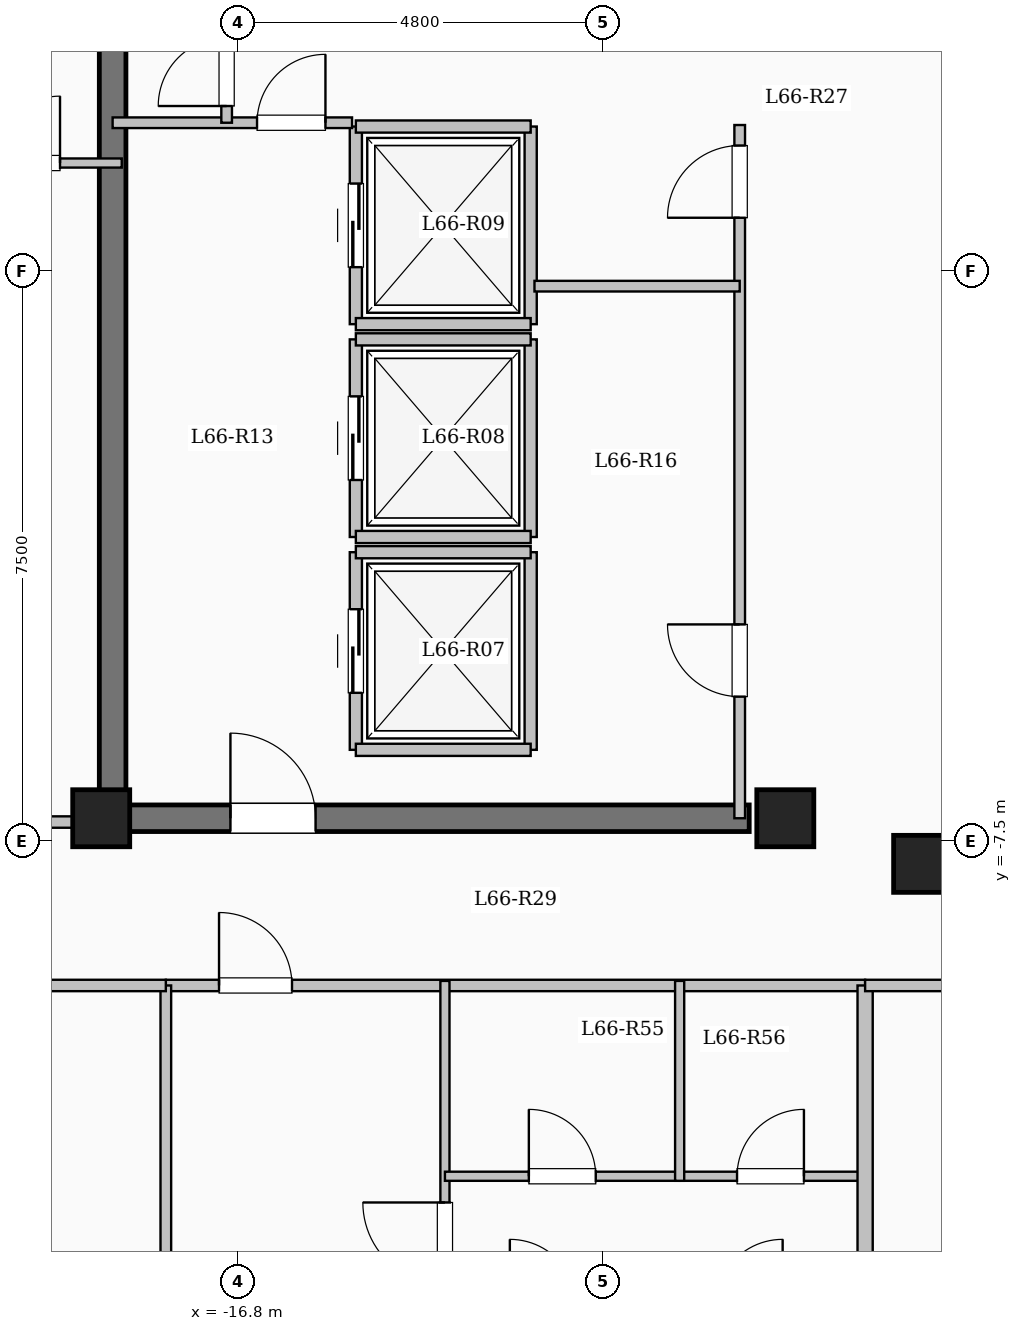
"""IFC4 building model, lengths in metres.
Left out: names, types, materials, properties, quantities, classifications, styles, units other than length and angle.
Written with IfcOpenShell. Run it as: python <this file> out.ifc"""

import sys

from ifc_helpers import new_model, si_unit, direction, frame, frame_2d, origin, origin_2d, place, context, subcontext, project, spatial, rectangle, extrude, element, fill, save


model = new_model("IFC4")
c1 = context("Model", 3, precision=1e-05, world=origin(), true_north=direction((0.0, 1.0)))
c2 = subcontext(c1, "Body", "Model", "MODEL_VIEW")
j1 = project(units=[si_unit("LENGTHUNIT", "METRE"), si_unit("PLANEANGLEUNIT", "RADIAN")], contexts=[c1])
p1 = place(None, origin())
s1 = spatial("IfcSite", under=j1, at=p1, CompositionType="ELEMENT")
p2 = place(p1, origin())
s2 = spatial("IfcBuilding", under=s1, at=p2, CompositionType="ELEMENT")
p3 = place(p2, frame((0.0, 0.0, 244.85)))
s3 = spatial("IfcBuildingStorey", under=s2, at=p3, CompositionType="ELEMENT", Elevation=244.85)
for number, where, z_axis, x_axis in (
    (1, (-7.8, -7.8, 0.0), (0.0, 0.0, 1.0), (1.0, 0.0, 0.0)),
    (2, (-9.6, -7.2, 0.0), (0.0, 0.0, 1.0), (1.0, 0.0, 0.0)),
    (3, (-18.6, -7.2, 0.0), (0.0, 0.0, 1.0), (1.0, 0.0, 0.0)),
):
    element("IfcColumn", number, at=place(p3, frame(where, z_axis=z_axis, x_axis=x_axis)), inside=s3, PredefinedType="COLUMN", context=c2, shape_type="SweptSolid", body=[
        extrude(rectangle(XDim=0.75, YDim=0.75, at=origin_2d()), origin(), (0.0, 0.0, 1.0), 3.35),
    ])
p4 = place(p3, frame((-15.25, -6.3, 0.0), z_axis=(0.0, 0.0, 1.0), x_axis=(0.0, 1.0, 0.0)))
e4 = element("IfcWall", 4, at=p4, inside=s3, PredefinedType="SOLIDWALL", context=c2, shape_type="SweptSolid", body=[
    extrude(rectangle(XDim=2.6, YDim=0.16, at=frame_2d((1.3, 0.0))), origin(), (0.0, 0.0, 1.0), 3.1),
])
p5 = place(p4, frame((0.75, 0.0, 0.0)))
e5 = element("IfcOpeningElement", 5, at=p5, cuts=e4, PredefinedType="OPENING", context=c2, shape_type="SweptSolid", body=[
    extrude(rectangle(XDim=1.1, YDim=2.15, at=frame_2d((0.55, 1.075))), frame((0.0, 0.09, 0.0), z_axis=(0.0, -1.0, 0.0), x_axis=(1.0, 0.0, 0.0)), (0.0, 0.0, 1.0), 0.18),
])
p6 = place(p3, frame((-12.95, -6.3, 0.0), z_axis=(0.0, 0.0, 1.0), x_axis=(0.0, 1.0, 0.0)))
e6 = element("IfcWall", 6, at=p6, inside=s3, PredefinedType="SOLIDWALL", context=c2, shape_type="SweptSolid", body=[
    extrude(rectangle(XDim=2.6, YDim=0.16, at=frame_2d((1.3, 0.0))), origin(), (0.0, 0.0, 1.0), 3.1),
])
for number, where, z_axis, x_axis in (
    (7, (-15.25, -6.3, 0.0), (0.0, 0.0, 1.0), (1.0, 0.0, 0.0)),
    (8, (-15.25, -3.7, 0.0), (0.0, 0.0, 1.0), (1.0, 0.0, 0.0)),
):
    element("IfcWall", number, at=place(p3, frame(where, z_axis=z_axis, x_axis=x_axis)), inside=s3, PredefinedType="SOLIDWALL", context=c2, shape_type="SweptSolid", body=[
        extrude(rectangle(XDim=2.3, YDim=0.16, at=frame_2d((1.15, 0.0))), origin(), (0.0, 0.0, 1.0), 3.1),
    ])
p7 = place(p3, frame((-15.25, -3.5, 0.0), z_axis=(0.0, 0.0, 1.0), x_axis=(0.0, 1.0, 0.0)))
e9 = element("IfcWall", 9, at=p7, inside=s3, PredefinedType="SOLIDWALL", context=c2, shape_type="SweptSolid", body=[
    extrude(rectangle(XDim=2.6, YDim=0.16, at=frame_2d((1.3, 0.0))), origin(), (0.0, 0.0, 1.0), 3.1),
])
p8 = place(p7, frame((0.75, 0.0, 0.0)))
e10 = element("IfcOpeningElement", 10, at=p8, cuts=e9, PredefinedType="OPENING", context=c2, shape_type="SweptSolid", body=[
    extrude(rectangle(XDim=1.1, YDim=2.15, at=frame_2d((0.55, 1.075))), frame((0.0, 0.09, 0.0), z_axis=(0.0, -1.0, 0.0), x_axis=(1.0, 0.0, 0.0)), (0.0, 0.0, 1.0), 0.18),
])
p9 = place(p3, frame((-12.95, -3.5, 0.0), z_axis=(0.0, 0.0, 1.0), x_axis=(0.0, 1.0, 0.0)))
e11 = element("IfcWall", 11, at=p9, inside=s3, PredefinedType="SOLIDWALL", context=c2, shape_type="SweptSolid", body=[
    extrude(rectangle(XDim=2.6, YDim=0.16, at=frame_2d((1.3, 0.0))), origin(), (0.0, 0.0, 1.0), 3.1),
])
for number, where, z_axis, x_axis in (
    (12, (-15.25, -3.5, 0.0), (0.0, 0.0, 1.0), (1.0, 0.0, 0.0)),
    (13, (-15.25, -0.9, 0.0), (0.0, 0.0, 1.0), (1.0, 0.0, 0.0)),
):
    element("IfcWall", number, at=place(p3, frame(where, z_axis=z_axis, x_axis=x_axis)), inside=s3, PredefinedType="SOLIDWALL", context=c2, shape_type="SweptSolid", body=[
        extrude(rectangle(XDim=2.3, YDim=0.16, at=frame_2d((1.15, 0.0))), origin(), (0.0, 0.0, 1.0), 3.1),
    ])
p10 = place(p3, frame((-15.25, -0.7, 0.0), z_axis=(0.0, 0.0, 1.0), x_axis=(0.0, 1.0, 0.0)))
e14 = element("IfcWall", 14, at=p10, inside=s3, PredefinedType="SOLIDWALL", context=c2, shape_type="SweptSolid", body=[
    extrude(rectangle(XDim=2.6, YDim=0.16, at=frame_2d((1.3, 0.0))), origin(), (0.0, 0.0, 1.0), 3.1),
])
p11 = place(p10, frame((0.75, 0.0, 0.0)))
e15 = element("IfcOpeningElement", 15, at=p11, cuts=e14, PredefinedType="OPENING", context=c2, shape_type="SweptSolid", body=[
    extrude(rectangle(XDim=1.1, YDim=2.15, at=frame_2d((0.55, 1.075))), frame((0.0, 0.09, 0.0), z_axis=(0.0, -1.0, 0.0), x_axis=(1.0, 0.0, 0.0)), (0.0, 0.0, 1.0), 0.18),
])
p12 = place(p3, frame((-12.95, -0.7, 0.0), z_axis=(0.0, 0.0, 1.0), x_axis=(0.0, 1.0, 0.0)))
e16 = element("IfcWall", 16, at=p12, inside=s3, PredefinedType="SOLIDWALL", context=c2, shape_type="SweptSolid", body=[
    extrude(rectangle(XDim=2.6, YDim=0.16, at=frame_2d((1.3, 0.0))), origin(), (0.0, 0.0, 1.0), 3.1),
])
for number, where, z_axis, x_axis in (
    (17, (-15.25, -0.7, 0.0), (0.0, 0.0, 1.0), (1.0, 0.0, 0.0)),
    (18, (-15.25, 1.9, 0.0), (0.0, 0.0, 1.0), (1.0, 0.0, 0.0)),
):
    element("IfcWall", number, at=place(p3, frame(where, z_axis=z_axis, x_axis=x_axis)), inside=s3, PredefinedType="SOLIDWALL", context=c2, shape_type="SweptSolid", body=[
        extrude(rectangle(XDim=2.3, YDim=0.16, at=frame_2d((1.15, 0.0))), origin(), (0.0, 0.0, 1.0), 3.1),
    ])
p13 = place(p3, frame((-18.45, -7.375, 0.0), z_axis=(0.0, 0.0, 1.0), x_axis=(0.0, 1.0, 0.0)))
e19 = element("IfcWall", 19, at=p13, inside=s3, PredefinedType="SHEAR", context=c2, shape_type="SweptSolid", body=[
    extrude(rectangle(XDim=14.05, YDim=0.35, at=frame_2d((7.025, 0.0))), origin(), (0.0, 0.0, 1.0), 3.35),
])
p14 = place(p3, frame((-18.625, -7.2, 0.0), z_axis=(0.0, 0.0, 1.0), x_axis=(1.0, 0.0, 0.0)))
e20 = element("IfcWall", 20, at=p14, inside=s3, PredefinedType="SHEAR", context=c2, shape_type="SweptSolid", body=[
    extrude(rectangle(XDim=8.55, YDim=0.35, at=frame_2d((4.275, 0.0))), origin(), (0.0, 0.0, 1.0), 3.35),
])
p15 = place(p14, frame((1.725, 0.0, 0.0)))
e21 = element("IfcOpeningElement", 21, at=p15, cuts=e20, PredefinedType="OPENING", context=c2, shape_type="SweptSolid", body=[
    extrude(rectangle(XDim=1.12, YDim=2.15, at=frame_2d((0.56, 1.075))), frame((0.0, 0.185, 0.0), z_axis=(0.0, -1.0, 0.0), x_axis=(1.0, 0.0, 0.0)), (0.0, 0.0, 1.0), 0.37),
])
p16 = place(p3, frame((-18.45, 1.95, 0.0), z_axis=(0.0, 0.0, 1.0), x_axis=(1.0, 0.0, 0.0)))
e22 = element("IfcWall", 22, at=p16, inside=s3, PredefinedType="PARTITIONING", context=c2, shape_type="SweptSolid", body=[
    extrude(rectangle(XDim=3.15, YDim=0.14, at=frame_2d((1.575, 0.0))), origin(), (0.0, 0.0, 1.0), 3.1),
])
p17 = place(p16, frame((1.9, 0.0, 0.0)))
e23 = element("IfcOpeningElement", 23, at=p17, cuts=e22, PredefinedType="OPENING", context=c2, shape_type="SweptSolid", body=[
    extrude(rectangle(XDim=0.9, YDim=2.08, at=frame_2d((0.45, 1.04))), frame((0.0, 0.08, 0.0), z_axis=(0.0, -1.0, 0.0), x_axis=(1.0, 0.0, 0.0)), (0.0, 0.0, 1.0), 0.16),
])
p18 = place(p3, frame((-16.95, 1.95, 0.0), z_axis=(0.0, 0.0, 1.0), x_axis=(0.0, 1.0, 0.0)))
e24 = element("IfcWall", 24, at=p18, inside=s3, PredefinedType="PARTITIONING", context=c2, shape_type="SweptSolid", body=[
    extrude(rectangle(XDim=1.3, YDim=0.14, at=frame_2d((0.65, 0.0))), origin(), (0.0, 0.0, 1.0), 3.1),
])
p19 = place(p18, frame((0.22, 0.0, 0.0)))
e25 = element("IfcOpeningElement", 25, at=p19, cuts=e24, PredefinedType="OPENING", context=c2, shape_type="SweptSolid", body=[
    extrude(rectangle(XDim=0.9, YDim=2.08, at=frame_2d((0.45, 1.04))), frame((0.0, 0.08, 0.0), z_axis=(0.0, -1.0, 0.0), x_axis=(1.0, 0.0, 0.0)), (0.0, 0.0, 1.0), 0.16),
])
p20 = place(p3, frame((-10.2, -7.2, 0.0), z_axis=(0.0, 0.0, 1.0), x_axis=(0.0, 1.0, 0.0)))
e26 = element("IfcWall", 26, at=p20, inside=s3, PredefinedType="PARTITIONING", context=c2, shape_type="SweptSolid", body=[
    extrude(rectangle(XDim=9.12, YDim=0.14, at=frame_2d((4.56, 0.0))), origin(), (0.0, 0.0, 1.0), 3.1),
])
p21 = place(p20, frame((1.6, 0.0, 0.0)))
e27 = element("IfcOpeningElement", 27, at=p21, cuts=e26, PredefinedType="OPENING", context=c2, shape_type="SweptSolid", body=[
    extrude(rectangle(XDim=0.95, YDim=2.12, at=frame_2d((0.475, 1.06))), frame((0.0, 0.08, 0.0), z_axis=(0.0, -1.0, 0.0), x_axis=(1.0, 0.0, 0.0)), (0.0, 0.0, 1.0), 0.16),
])
p22 = place(p20, frame((7.9, 0.0, 0.0)))
e28 = element("IfcOpeningElement", 28, at=p22, cuts=e26, PredefinedType="OPENING", context=c2, shape_type="SweptSolid", body=[
    extrude(rectangle(XDim=0.95, YDim=2.12, at=frame_2d((0.475, 1.06))), frame((0.0, 0.08, 0.0), z_axis=(0.0, -1.0, 0.0), x_axis=(1.0, 0.0, 0.0)), (0.0, 0.0, 1.0), 0.16),
])
p23 = place(p3, frame((-12.9, -0.2, 0.0), z_axis=(0.0, 0.0, 1.0), x_axis=(1.0, 0.0, 0.0)))
e29 = element("IfcWall", 29, at=p23, inside=s3, PredefinedType="PARTITIONING", context=c2, shape_type="SweptSolid", body=[
    extrude(rectangle(XDim=2.7, YDim=0.14, at=frame_2d((1.35, 0.0))), origin(), (0.0, 0.0, 1.0), 3.1),
])
p24 = place(p3, frame((-17.75, -9.4, 0.0), z_axis=(0.0, 0.0, 1.0), x_axis=(1.0, 0.0, 0.0)))
e30 = element("IfcWall", 30, at=p24, inside=s3, PredefinedType="PARTITIONING", context=c2, shape_type="SweptSolid", body=[
    extrude(rectangle(XDim=9.2, YDim=0.15, at=frame_2d((4.6, 0.0))), origin(), (0.0, 0.0, 1.0), 3.1),
])
p25 = place(p24, frame((0.7, 0.0, 0.0)))
e31 = element("IfcOpeningElement", 31, at=p25, cuts=e30, PredefinedType="OPENING", context=c2, shape_type="SweptSolid", body=[
    extrude(rectangle(XDim=0.96, YDim=2.15, at=frame_2d((0.48, 1.075))), frame((0.0, 0.085, 0.0), z_axis=(0.0, -1.0, 0.0), x_axis=(1.0, 0.0, 0.0)), (0.0, 0.0, 1.0), 0.17),
])
p26 = place(p3, frame((-14.078, -20.9, 0.0), z_axis=(0.0, 0.0, 1.0), x_axis=(0.0, 1.0, 0.0)))
e32 = element("IfcWall", 32, at=p26, inside=s3, PredefinedType="PARTITIONING", context=c2, shape_type="SweptSolid", body=[
    extrude(rectangle(XDim=11.56, YDim=0.12, at=frame_2d((5.78, 0.0))), origin(), (0.0, 0.0, 1.0), 3.1),
])
p27 = place(p26, frame((7.565, 0.0, 0.0)))
e33 = element("IfcOpeningElement", 33, at=p27, cuts=e32, PredefinedType="OPENING", context=c2, shape_type="SweptSolid", body=[
    extrude(rectangle(XDim=1.08, YDim=2.15, at=frame_2d((0.54, 1.075))), frame((0.0, 0.07, 0.0), z_axis=(0.0, -1.0, 0.0), x_axis=(1.0, 0.0, 0.0)), (0.0, 0.0, 1.0), 0.14),
])
p28 = place(p3, frame((-14.078, -11.91, 0.0), z_axis=(0.0, 0.0, 1.0), x_axis=(1.0, 0.0, 0.0)))
e34 = element("IfcWall", 34, at=p28, inside=s3, PredefinedType="PARTITIONING", context=c2, shape_type="SweptSolid", body=[
    extrude(rectangle(XDim=3.088, YDim=0.12, at=frame_2d((1.544, 0.0))), origin(), (0.0, 0.0, 1.0), 3.1),
])
p29 = place(p28, frame((1.104, 0.0, 0.0)))
e35 = element("IfcOpeningElement", 35, at=p29, cuts=e34, PredefinedType="OPENING", context=c2, shape_type="SweptSolid", body=[
    extrude(rectangle(XDim=0.88, YDim=2.1, at=frame_2d((0.44, 1.05))), frame((0.0, 0.07, 0.0), z_axis=(0.0, -1.0, 0.0), x_axis=(1.0, 0.0, 0.0)), (0.0, 0.0, 1.0), 0.14),
])
p30 = place(p3, frame((-10.99, -11.91, 0.0), z_axis=(0.0, 0.0, 1.0), x_axis=(1.0, 0.0, 0.0)))
e36 = element("IfcWall", 36, at=p30, inside=s3, PredefinedType="PARTITIONING", context=c2, shape_type="SweptSolid", body=[
    extrude(rectangle(XDim=2.39, YDim=0.12, at=frame_2d((1.195, 0.0))), origin(), (0.0, 0.0, 1.0), 3.1),
])
p31 = place(p30, frame((0.755, 0.0, 0.0)))
e37 = element("IfcOpeningElement", 37, at=p31, cuts=e36, PredefinedType="OPENING", context=c2, shape_type="SweptSolid", body=[
    extrude(rectangle(XDim=0.88, YDim=2.1, at=frame_2d((0.44, 1.05))), frame((0.0, 0.07, 0.0), z_axis=(0.0, -1.0, 0.0), x_axis=(1.0, 0.0, 0.0)), (0.0, 0.0, 1.0), 0.14),
])
p32 = place(p3, frame((-10.99, -11.97, 0.0), z_axis=(0.0, 0.0, 1.0), x_axis=(0.0, 1.0, 0.0)))
e38 = element("IfcWall", 38, at=p32, inside=s3, PredefinedType="PARTITIONING", context=c2, shape_type="SweptSolid", body=[
    extrude(rectangle(XDim=2.63, YDim=0.12, at=frame_2d((1.315, 0.0))), origin(), (0.0, 0.0, 1.0), 3.1),
])
p33 = place(p3, frame((-8.55, -21.504, 0.0), z_axis=(0.0, 0.0, 1.0), x_axis=(0.0, 1.0, 0.0)))
e39 = element("IfcWall", 39, at=p33, inside=s3, PredefinedType="SOLIDWALL", context=c2, shape_type="SweptSolid", body=[
    extrude(rectangle(XDim=12.104, YDim=0.2, at=frame_2d((6.052, 0.0))), origin(), (0.0, 0.0, 1.0), 3.1),
])
p34 = place(p3, frame((-8.55, -9.4, 0.0), z_axis=(0.0, 0.0, 1.0), x_axis=(1.0, 0.0, 0.0)))
e40 = element("IfcWall", 40, at=p34, inside=s3, PredefinedType="PARTITIONING", context=c2, shape_type="SweptSolid", body=[
    extrude(rectangle(XDim=17.1, YDim=0.15, at=frame_2d((8.55, 0.0))), origin(), (0.0, 0.0, 1.0), 3.1),
])
p35 = place(p34, frame((1.75, 0.0, 0.0)))
e41 = element("IfcOpeningElement", 41, at=p35, cuts=e40, PredefinedType="OPENING", context=c2, shape_type="SweptSolid", body=[
    extrude(rectangle(XDim=0.96, YDim=2.15, at=frame_2d((0.48, 1.075))), frame((0.0, 0.085, 0.0), z_axis=(0.0, -1.0, 0.0), x_axis=(1.0, 0.0, 0.0)), (0.0, 0.0, 1.0), 0.17),
])
p36 = place(p3, frame((-22.68, -7.25, 0.0), z_axis=(0.0, 0.0, 1.0), x_axis=(1.0, 0.0, 0.0)))
e42 = element("IfcWall", 42, at=p36, inside=s3, PredefinedType="PARTITIONING", context=c2, shape_type="SweptSolid", body=[
    extrude(rectangle(XDim=4.23, YDim=0.15, at=frame_2d((2.115, 0.0))), origin(), (0.0, 0.0, 1.0), 3.1),
])
p37 = place(p36, frame((1.73, 0.0, 0.0)))
e43 = element("IfcOpeningElement", 43, at=p37, cuts=e42, PredefinedType="OPENING", context=c2, shape_type="SweptSolid", body=[
    extrude(rectangle(XDim=0.96, YDim=2.15, at=frame_2d((0.48, 1.075))), frame((0.0, 0.085, 0.0), z_axis=(0.0, -1.0, 0.0), x_axis=(1.0, 0.0, 0.0)), (0.0, 0.0, 1.0), 0.17),
])
p38 = place(p3, frame((-17.75, -17.55, 0.0), z_axis=(0.0, 0.0, 1.0), x_axis=(0.0, 1.0, 0.0)))
e44 = element("IfcWall", 44, at=p38, inside=s3, PredefinedType="PARTITIONING", context=c2, shape_type="SweptSolid", body=[
    extrude(rectangle(XDim=8.15, YDim=0.14, at=frame_2d((4.075, 0.0))), origin(), (0.0, 0.0, 1.0), 3.1),
])
p39 = place(p3, frame((-22.68, -9.4, 0.0), z_axis=(0.0, 0.0, 1.0), x_axis=(1.0, 0.0, 0.0)))
e45 = element("IfcWall", 45, at=p39, inside=s3, PredefinedType="PARTITIONING", context=c2, shape_type="SweptSolid", body=[
    extrude(rectangle(XDim=4.93, YDim=0.15, at=frame_2d((2.465, 0.0))), origin(), (0.0, 0.0, 1.0), 3.1),
])
p40 = place(p39, frame((1.99, 0.0, 0.0)))
e46 = element("IfcOpeningElement", 46, at=p40, cuts=e45, PredefinedType="OPENING", context=c2, shape_type="SweptSolid", body=[
    extrude(rectangle(XDim=0.95, YDim=2.15, at=frame_2d((0.475, 1.075))), frame((0.0, 0.085, 0.0), z_axis=(0.0, -1.0, 0.0), x_axis=(1.0, 0.0, 0.0)), (0.0, 0.0, 1.0), 0.17),
])
p41 = place(p3, frame((-22.8, 1.42, 0.0), z_axis=(0.0, 0.0, 1.0), x_axis=(1.0, 0.0, 0.0)))
e47 = element("IfcWall", 47, at=p41, inside=s3, PredefinedType="PARTITIONING", context=c2, shape_type="SweptSolid", body=[
    extrude(rectangle(XDim=4.47, YDim=0.12, at=frame_2d((2.235, 0.0))), origin(), (0.0, 0.0, 1.0), 3.1),
])
p42 = place(p41, frame((0.713, 0.0, 0.0)))
e48 = element("IfcOpeningElement", 48, at=p42, cuts=e47, PredefinedType="OPENING", context=c2, shape_type="SweptSolid", body=[
    extrude(rectangle(XDim=0.88, YDim=2.1, at=frame_2d((0.44, 1.05))), frame((0.0, 0.07, 0.0), z_axis=(0.0, -1.0, 0.0), x_axis=(1.0, 0.0, 0.0)), (0.0, 0.0, 1.0), 0.14),
])
p43 = place(p41, frame((2.778, 0.0, 0.0)))
e49 = element("IfcOpeningElement", 49, at=p43, cuts=e47, PredefinedType="OPENING", context=c2, shape_type="SweptSolid", body=[
    extrude(rectangle(XDim=0.88, YDim=2.1, at=frame_2d((0.44, 1.05))), frame((0.0, 0.07, 0.0), z_axis=(0.0, -1.0, 0.0), x_axis=(1.0, 0.0, 0.0)), (0.0, 0.0, 1.0), 0.14),
])
p44 = place(p5, origin())
e50 = element("IfcDoor", 50, at=p44, inside=s3, OperationType="SLIDING_TO_LEFT", PredefinedType="DOOR", context=c2, shape_type="SweptSolid", body=[
    extrude(rectangle(XDim=1.1, YDim=2.15, at=frame_2d((0.55, 1.075))), frame((0.0, 0.025, 0.0), z_axis=(0.0, -1.0, 0.0), x_axis=(1.0, 0.0, 0.0)), (0.0, 0.0, 1.0), 0.05),
])
fill(e5, e50)
p45 = place(p8, origin())
e51 = element("IfcDoor", 51, at=p45, inside=s3, OperationType="SLIDING_TO_LEFT", PredefinedType="DOOR", context=c2, shape_type="SweptSolid", body=[
    extrude(rectangle(XDim=1.1, YDim=2.15, at=frame_2d((0.55, 1.075))), frame((0.0, 0.025, 0.0), z_axis=(0.0, -1.0, 0.0), x_axis=(1.0, 0.0, 0.0)), (0.0, 0.0, 1.0), 0.05),
])
fill(e10, e51)
p46 = place(p11, origin())
e52 = element("IfcDoor", 52, at=p46, inside=s3, OperationType="SLIDING_TO_LEFT", PredefinedType="DOOR", context=c2, shape_type="SweptSolid", body=[
    extrude(rectangle(XDim=1.1, YDim=2.15, at=frame_2d((0.55, 1.075))), frame((0.0, 0.025, 0.0), z_axis=(0.0, -1.0, 0.0), x_axis=(1.0, 0.0, 0.0)), (0.0, 0.0, 1.0), 0.05),
])
fill(e15, e52)
p47 = place(p15, origin())
e53 = element("IfcDoor", 53, at=p47, inside=s3, OperationType="SINGLE_SWING_LEFT", PredefinedType="DOOR", context=c2, shape_type="SweptSolid", body=[
    extrude(rectangle(XDim=1.12, YDim=2.15, at=frame_2d((0.56, 1.075))), frame((0.0, 0.025, 0.0), z_axis=(0.0, -1.0, 0.0), x_axis=(1.0, 0.0, 0.0)), (0.0, 0.0, 1.0), 0.05),
])
fill(e21, e53)
p48 = place(p17, origin())
e54 = element("IfcDoor", 54, at=p48, inside=s3, OperationType="SINGLE_SWING_RIGHT", PredefinedType="DOOR", context=c2, shape_type="SweptSolid", body=[
    extrude(rectangle(XDim=0.9, YDim=2.08, at=frame_2d((0.45, 1.04))), frame((0.0, 0.025, 0.0), z_axis=(0.0, -1.0, 0.0), x_axis=(1.0, 0.0, 0.0)), (0.0, 0.0, 1.0), 0.05),
])
fill(e23, e54)
p49 = place(p19, origin())
e55 = element("IfcDoor", 55, at=p49, inside=s3, OperationType="SINGLE_SWING_LEFT", PredefinedType="DOOR", context=c2, shape_type="SweptSolid", body=[
    extrude(rectangle(XDim=0.9, YDim=2.08, at=frame_2d((0.45, 1.04))), frame((0.0, 0.025, 0.0), z_axis=(0.0, -1.0, 0.0), x_axis=(1.0, 0.0, 0.0)), (0.0, 0.0, 1.0), 0.05),
])
fill(e25, e55)
p50 = place(p21, origin())
e56 = element("IfcDoor", 56, at=p50, inside=s3, OperationType="SINGLE_SWING_RIGHT", PredefinedType="DOOR", context=c2, shape_type="SweptSolid", body=[
    extrude(rectangle(XDim=0.95, YDim=2.12, at=frame_2d((0.475, 1.06))), frame((0.0, 0.025, 0.0), z_axis=(0.0, -1.0, 0.0), x_axis=(1.0, 0.0, 0.0)), (0.0, 0.0, 1.0), 0.05),
])
fill(e27, e56)
p51 = place(p22, origin())
e57 = element("IfcDoor", 57, at=p51, inside=s3, OperationType="SINGLE_SWING_LEFT", PredefinedType="DOOR", context=c2, shape_type="SweptSolid", body=[
    extrude(rectangle(XDim=0.95, YDim=2.12, at=frame_2d((0.475, 1.06))), frame((0.0, 0.025, 0.0), z_axis=(0.0, -1.0, 0.0), x_axis=(1.0, 0.0, 0.0)), (0.0, 0.0, 1.0), 0.05),
])
fill(e28, e57)
p52 = place(p25, origin())
e58 = element("IfcDoor", 58, at=p52, inside=s3, OperationType="SINGLE_SWING_LEFT", PredefinedType="DOOR", context=c2, shape_type="SweptSolid", body=[
    extrude(rectangle(XDim=0.96, YDim=2.15, at=frame_2d((0.48, 1.075))), frame((0.0, 0.025, 0.0), z_axis=(0.0, -1.0, 0.0), x_axis=(1.0, 0.0, 0.0)), (0.0, 0.0, 1.0), 0.05),
])
fill(e31, e58)
p53 = place(p27, origin())
e59 = element("IfcDoor", 59, at=p53, inside=s3, OperationType="SINGLE_SWING_RIGHT", PredefinedType="DOOR", context=c2, shape_type="SweptSolid", body=[
    extrude(rectangle(XDim=1.08, YDim=2.15, at=frame_2d((0.54, 1.075))), frame((0.0, 0.025, 0.0), z_axis=(0.0, -1.0, 0.0), x_axis=(1.0, 0.0, 0.0)), (0.0, 0.0, 1.0), 0.05),
])
fill(e33, e59)
p54 = place(p29, origin())
e60 = element("IfcDoor", 60, at=p54, inside=s3, OperationType="SINGLE_SWING_LEFT", PredefinedType="DOOR", context=c2, shape_type="SweptSolid", body=[
    extrude(rectangle(XDim=0.88, YDim=2.1, at=frame_2d((0.44, 1.05))), frame((0.0, 0.025, 0.0), z_axis=(0.0, -1.0, 0.0), x_axis=(1.0, 0.0, 0.0)), (0.0, 0.0, 1.0), 0.05),
])
fill(e35, e60)
p55 = place(p31, origin())
e61 = element("IfcDoor", 61, at=p55, inside=s3, OperationType="SINGLE_SWING_RIGHT", PredefinedType="DOOR", context=c2, shape_type="SweptSolid", body=[
    extrude(rectangle(XDim=0.88, YDim=2.1, at=frame_2d((0.44, 1.05))), frame((0.0, 0.025, 0.0), z_axis=(0.0, -1.0, 0.0), x_axis=(1.0, 0.0, 0.0)), (0.0, 0.0, 1.0), 0.05),
])
fill(e37, e61)
p56 = place(p43, origin())
e62 = element("IfcDoor", 62, at=p56, inside=s3, OperationType="SINGLE_SWING_RIGHT", PredefinedType="DOOR", context=c2, shape_type="SweptSolid", body=[
    extrude(rectangle(XDim=0.88, YDim=2.1, at=frame_2d((0.44, 1.05))), frame((0.0, 0.025, 0.0), z_axis=(0.0, -1.0, 0.0), x_axis=(1.0, 0.0, 0.0)), (0.0, 0.0, 1.0), 0.05),
])
fill(e49, e62)
save(model, sys.argv[1])
